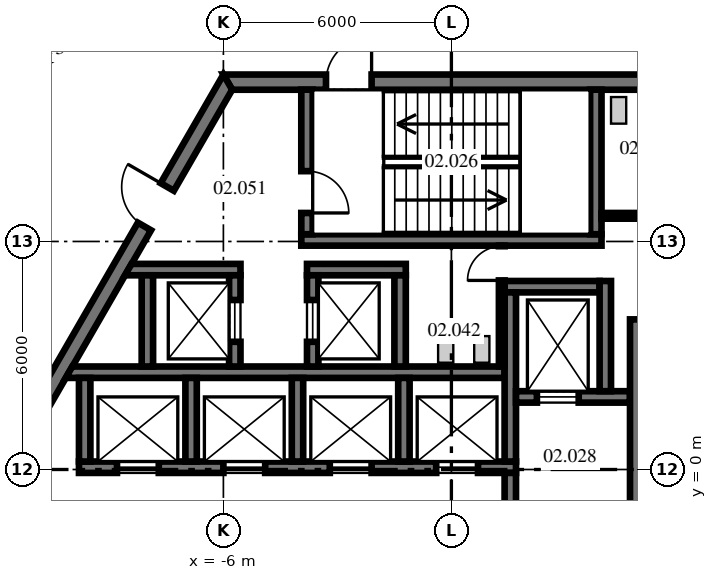
"""IFC4 building model, lengths in metres.
Left out: names, types, materials, properties, quantities, classifications, styles, units other than length and angle.
Written with IfcOpenShell. Run it as: python <this file> out.ifc"""

import sys

from ifc_helpers import new_model, si_unit, direction, frame, frame_2d, origin, place, context, subcontext, project, spatial, polyline, rectangle, outline, extrude, source, transform, mapped, element, fill, save


model = new_model("IFC4")
c1 = context("Model", 3, precision=1e-05, world=origin(), true_north=direction((0.0, 1.0)))
c2 = subcontext(c1, "Body", "Model", "MODEL_VIEW")
j1 = project(units=[si_unit("LENGTHUNIT", "METRE"), si_unit("PLANEANGLEUNIT", "RADIAN")], contexts=[c1])
p1 = place(None, origin())
s1 = spatial("IfcSite", under=j1, at=p1, CompositionType="ELEMENT")
p2 = place(p1, origin())
s2 = spatial("IfcBuilding", under=s1, at=p2, CompositionType="ELEMENT")
p3 = place(p2, frame((0.0, 0.0, 11.5)))
s3 = spatial("IfcBuildingStorey", under=s2, at=p3, CompositionType="ELEMENT", Elevation=11.5)
m1 = source(origin(), c2, "Body", "SweptSolid", [
    extrude(outline(polyline([(-0.115, -0.2), (11.885, -0.2), (11.654, 0.2), (0.115, 0.2), (-0.115, -0.2)])), origin(), (0.0, 0.0, 1.0), 4.3),
])
p4 = place(p3, frame((5.885, 10.192, 0.0), z_axis=(0.0, 0.0, 1.0), x_axis=(-1.0, 0.0, 0.0)))
e1 = element("IfcWall", 1, at=p4, inside=s3, PredefinedType="SHEAR", context=c2, shape_type="MappedRepresentation", body=[
    mapped(m1, transform((0.0, 0.0, 0.0), scale=1.0)),
])
p5 = place(p4, frame((7.985, 0.0, 0.0)))
e2 = element("IfcOpeningElement", 2, at=p5, cuts=e1, PredefinedType="OPENING", context=c2, shape_type="SweptSolid", body=[
    extrude(rectangle(XDim=1.2, YDim=2.1, at=frame_2d((0.6, 1.05))), frame((0.0, 0.21, 0.0), z_axis=(0.0, -1.0, 0.0), x_axis=(1.0, 0.0, 0.0)), (0.0, 0.0, 1.0), 0.42),
])
p6 = place(p3, frame((-5.885, 10.192, 0.0), z_axis=(0.0, 0.0, 1.0), x_axis=(-0.499996592174, -0.866027371285, 0.0)))
e3 = element("IfcWall", 3, at=p6, inside=s3, PredefinedType="SHEAR", context=c2, shape_type="MappedRepresentation", body=[
    mapped(m1, transform((0.0, 0.0, 0.0), scale=1.0)),
])
p7 = place(p6, frame((3.185, 0.0, 0.0)))
e4 = element("IfcOpeningElement", 4, at=p7, cuts=e3, PredefinedType="OPENING", context=c2, shape_type="SweptSolid", body=[
    extrude(rectangle(XDim=1.2, YDim=2.1, at=frame_2d((0.6, 1.05))), frame((0.0, 0.21, 0.0), z_axis=(0.0, -1.0, 0.0), x_axis=(1.0, 0.0, 0.0)), (0.0, 0.0, 1.0), 0.42),
])
p8 = place(p3, frame((-11.769, 0.0, 0.0), z_axis=(0.0, 0.0, 1.0), x_axis=(0.499996592174, -0.866027371285, 0.0)))
e5 = element("IfcWall", 5, at=p8, inside=s3, PredefinedType="SHEAR", context=c2, shape_type="MappedRepresentation", body=[
    mapped(m1, transform((0.0, 0.0, 0.0), scale=1.0)),
])
p9 = place(p8, frame((1.405, 0.0, 0.0)))
e6 = element("IfcOpeningElement", 6, at=p9, cuts=e5, PredefinedType="OPENING", context=c2, shape_type="SweptSolid", body=[
    extrude(rectangle(XDim=1.8, YDim=2.1, at=frame_2d((0.9, 1.05))), frame((0.0, 0.21, 0.0), z_axis=(0.0, -1.0, 0.0), x_axis=(1.0, 0.0, 0.0)), (0.0, 0.0, 1.0), 0.42),
])
p10 = place(p8, frame((7.915, 0.0, 0.0)))
e7 = element("IfcOpeningElement", 7, at=p10, cuts=e5, PredefinedType="OPENING", context=c2, shape_type="SweptSolid", body=[
    extrude(rectangle(XDim=1.2, YDim=2.1, at=frame_2d((0.6, 1.05))), frame((0.0, 0.21, 0.0), z_axis=(0.0, -1.0, 0.0), x_axis=(1.0, 0.0, 0.0)), (0.0, 0.0, 1.0), 0.42),
])
m2 = source(origin(), c2, "Body", "SweptSolid", [
    extrude(rectangle(XDim=11.5, YDim=0.3, at=frame_2d((5.75, 0.0))), origin(), (0.0, 0.0, 1.0), 4.3),
])
p11 = place(p3, frame((-9.8, 0.06, 0.0), z_axis=(0.0, 0.0, 1.0), x_axis=(1.0, 0.0, 0.0)))
e8 = element("IfcWall", 8, at=p11, inside=s3, PredefinedType="SHEAR", context=c2, shape_type="MappedRepresentation", body=[
    mapped(m2, transform((0.0, 0.0, 0.0), scale=1.0)),
])
p12 = place(p11, frame((1.0, 0.0, 0.0)))
e9 = element("IfcOpeningElement", 9, at=p12, cuts=e8, PredefinedType="OPENING", context=c2, shape_type="SweptSolid", body=[
    extrude(rectangle(XDim=1.1, YDim=2.1, at=frame_2d((0.55, 1.05))), frame((0.0, 0.16, 0.0), z_axis=(0.0, -1.0, 0.0), x_axis=(1.0, 0.0, 0.0)), (0.0, 0.0, 1.0), 0.32),
])
p13 = place(p11, frame((3.8, 0.0, 0.0)))
e10 = element("IfcOpeningElement", 10, at=p13, cuts=e8, PredefinedType="OPENING", context=c2, shape_type="SweptSolid", body=[
    extrude(rectangle(XDim=1.1, YDim=2.1, at=frame_2d((0.55, 1.05))), frame((0.0, 0.16, 0.0), z_axis=(0.0, -1.0, 0.0), x_axis=(1.0, 0.0, 0.0)), (0.0, 0.0, 1.0), 0.32),
])
p14 = place(p11, frame((6.6, 0.0, 0.0)))
e11 = element("IfcOpeningElement", 11, at=p14, cuts=e8, PredefinedType="OPENING", context=c2, shape_type="SweptSolid", body=[
    extrude(rectangle(XDim=1.1, YDim=2.1, at=frame_2d((0.55, 1.05))), frame((0.0, 0.16, 0.0), z_axis=(0.0, -1.0, 0.0), x_axis=(1.0, 0.0, 0.0)), (0.0, 0.0, 1.0), 0.32),
])
p15 = place(p11, frame((9.4, 0.0, 0.0)))
e12 = element("IfcOpeningElement", 12, at=p15, cuts=e8, PredefinedType="OPENING", context=c2, shape_type="SweptSolid", body=[
    extrude(rectangle(XDim=1.1, YDim=2.1, at=frame_2d((0.55, 1.05))), frame((0.0, 0.16, 0.0), z_axis=(0.0, -1.0, 0.0), x_axis=(1.0, 0.0, 0.0)), (0.0, 0.0, 1.0), 0.32),
])
m3 = source(origin(), c2, "Body", "SweptSolid", [
    extrude(outline(polyline([(11.2, -0.15), (-0.349, -0.15), (-0.176, 0.15), (11.2, 0.15), (11.2, -0.15)])), origin(), (0.0, 0.0, 1.0), 4.3),
])
p16 = place(p3, frame((-9.8, 2.56, 0.0), z_axis=(0.0, 0.0, 1.0), x_axis=(1.0, 0.0, 0.0)))
e13 = element("IfcWall", 13, at=p16, inside=s3, PredefinedType="SHEAR", context=c2, shape_type="MappedRepresentation", body=[
    mapped(m3, transform((0.0, 0.0, 0.0), scale=1.0)),
])
m4 = source(origin(), c2, "Body", "SweptSolid", [
    extrude(rectangle(XDim=2.5, YDim=0.3, at=frame_2d((1.25, 0.0))), origin(), (0.0, 0.0, 1.0), 4.3),
])
p17 = place(p3, frame((1.4, 4.81, 0.0), z_axis=(0.0, 0.0, 1.0), x_axis=(1.0, 0.0, 0.0)))
e14 = element("IfcWall", 14, at=p17, inside=s3, PredefinedType="SHEAR", context=c2, shape_type="MappedRepresentation", body=[
    mapped(m4, transform((0.0, 0.0, 0.0), scale=1.0)),
])
m5 = source(origin(), c2, "Body", "SweptSolid", [
    extrude(rectangle(XDim=4.45, YDim=0.3, at=frame_2d((2.225, 0.0))), origin(), (0.0, 0.0, 1.0), 4.3),
])
p18 = place(p3, frame((1.55, 0.21, 0.0), z_axis=(0.0, 0.0, 1.0), x_axis=(0.0, 1.0, 0.0)))
e15 = element("IfcWall", 15, at=p18, inside=s3, PredefinedType="SHEAR", context=c2, shape_type="MappedRepresentation", body=[
    mapped(m5, transform((0.0, 0.0, 0.0), scale=1.0)),
])
m6 = source(origin(), c2, "Body", "SweptSolid", [
    extrude(rectangle(XDim=3.0, YDim=0.3, at=frame_2d((1.5, 0.0))), origin(), (0.0, 0.0, 1.0), 4.3),
])
p19 = place(p3, frame((1.7, 1.91, 0.0), z_axis=(0.0, 0.0, 1.0), x_axis=(1.0, 0.0, 0.0)))
e16 = element("IfcWall", 16, at=p19, inside=s3, PredefinedType="SHEAR", context=c2, shape_type="MappedRepresentation", body=[
    mapped(m6, transform((0.0, 0.0, 0.0), scale=1.0)),
])
p20 = place(p19, frame((0.55, 0.0, 0.0)))
e17 = element("IfcOpeningElement", 17, at=p20, cuts=e16, PredefinedType="OPENING", context=c2, shape_type="SweptSolid", body=[
    extrude(rectangle(XDim=1.1, YDim=2.1, at=frame_2d((0.55, 1.05))), frame((0.0, 0.16, 0.0), z_axis=(0.0, -1.0, 0.0), x_axis=(1.0, 0.0, 0.0)), (0.0, 0.0, 1.0), 0.32),
])
m7 = source(origin(), c2, "Body", "SweptSolid", [
    extrude(rectangle(XDim=2.9, YDim=0.3, at=frame_2d((1.45, 0.0))), origin(), (0.0, 0.0, 1.0), 4.3),
])
p21 = place(p3, frame((4.05, 2.06, 0.0), z_axis=(0.0, 0.0, 1.0), x_axis=(0.0, 1.0, 0.0)))
e18 = element("IfcWall", 18, at=p21, inside=s3, PredefinedType="SHEAR", context=c2, shape_type="MappedRepresentation", body=[
    mapped(m7, transform((0.0, 0.0, 0.0), scale=1.0)),
])
m8 = source(origin(), c2, "Body", "SweptSolid", [
    extrude(rectangle(XDim=2.2, YDim=0.3, at=frame_2d((1.1, 0.0))), origin(), (0.0, 0.0, 1.0), 4.3),
])
p22 = place(p3, frame((-9.65, 0.21, 0.0), z_axis=(0.0, 0.0, 1.0), x_axis=(0.0, 1.0, 0.0)))
e19 = element("IfcWall", 19, at=p22, inside=s3, PredefinedType="SHEAR", context=c2, shape_type="MappedRepresentation", body=[
    mapped(m8, transform((0.0, 0.0, 0.0), scale=1.0)),
])
p23 = place(p3, frame((1.55, -3.09, 0.0), z_axis=(0.0, 0.0, 1.0), x_axis=(0.0, 1.0, 0.0)))
e20 = element("IfcWall", 20, at=p23, inside=s3, PredefinedType="SHEAR", context=c2, shape_type="MappedRepresentation", body=[
    mapped(m6, transform((0.0, 0.0, 0.0), scale=1.0)),
])
p24 = place(p23, frame((0.9, 0.0, 0.0)))
e21 = element("IfcOpeningElement", 21, at=p24, cuts=e20, PredefinedType="OPENING", context=c2, shape_type="SweptSolid", body=[
    extrude(rectangle(XDim=1.2, YDim=2.1, at=frame_2d((0.6, 1.05))), frame((0.0, 0.16, 0.0), z_axis=(0.0, -1.0, 0.0), x_axis=(1.0, 0.0, 0.0)), (0.0, 0.0, 1.0), 0.32),
])
m9 = source(origin(), c2, "Body", "SweptSolid", [
    extrude(outline(polyline([(-0.15, -0.15), (9.99, -0.15), (9.99, 0.15), (0.15, 0.15), (-0.15, -0.15)])), origin(), (0.0, 0.0, 1.0), 4.3),
])
p25 = place(p3, frame((4.85, -6.04, 0.0), z_axis=(0.0, 0.0, 1.0), x_axis=(0.0, 1.0, 0.0)))
e22 = element("IfcWall", 22, at=p25, inside=s3, PredefinedType="SHEAR", context=c2, shape_type="MappedRepresentation", body=[
    mapped(m9, transform((0.0, 0.0, 0.0), scale=1.0)),
])
p26 = place(p25, frame((3.19, 0.0, 0.0)))
e23 = element("IfcOpeningElement", 23, at=p26, cuts=e22, PredefinedType="OPENING", context=c2, shape_type="SweptSolid", body=[
    extrude(rectangle(XDim=1.1, YDim=2.1, at=frame_2d((0.55, 1.05))), frame((0.0, 0.16, 0.0), z_axis=(0.0, -1.0, 0.0), x_axis=(1.0, 0.0, 0.0)), (0.0, 0.0, 1.0), 0.32),
])
m10 = source(origin(), c2, "Body", "SweptSolid", [
    extrude(rectangle(XDim=7.9, YDim=0.3, at=frame_2d((3.95, 0.0))), origin(), (0.0, 0.0, 1.0), 4.3),
])
p27 = place(p3, frame((-3.95, 6.04, 0.0), z_axis=(0.0, 0.0, 1.0), x_axis=(1.0, 0.0, 0.0)))
e24 = element("IfcWall", 24, at=p27, inside=s3, PredefinedType="SHEAR", context=c2, shape_type="MappedRepresentation", body=[
    mapped(m10, transform((0.0, 0.0, 0.0), scale=1.0)),
])
m11 = source(origin(), c2, "Body", "SweptSolid", [
    extrude(outline(polyline([(0.0, -0.15), (0.0, 0.15), (3.804, 0.15), (3.804, -0.15), (0.0, -0.15)])), origin(), (0.0, 0.0, 1.0), 4.3),
])
p28 = place(p3, frame((-3.8, 6.19, 0.0), z_axis=(0.0, 0.0, 1.0), x_axis=(0.0, 1.0, 0.0)))
e25 = element("IfcWall", 25, at=p28, inside=s3, PredefinedType="SHEAR", context=c2, shape_type="MappedRepresentation", body=[
    mapped(m11, transform((0.0, 0.0, 0.0), scale=1.0)),
])
p29 = place(p28, frame((0.56, 0.0, 0.0)))
e26 = element("IfcOpeningElement", 26, at=p29, cuts=e25, PredefinedType="OPENING", context=c2, shape_type="SweptSolid", body=[
    extrude(rectangle(XDim=1.1, YDim=2.1, at=frame_2d((0.55, 1.05))), frame((0.0, 0.16, 0.0), z_axis=(0.0, -1.0, 0.0), x_axis=(1.0, 0.0, 0.0)), (0.0, 0.0, 1.0), 0.32),
])
p30 = place(p3, frame((3.8, 6.19, 0.0), z_axis=(0.0, 0.0, 1.0), x_axis=(0.0, 1.0, 0.0)))
e27 = element("IfcWall", 27, at=p30, inside=s3, PredefinedType="SHEAR", context=c2, shape_type="MappedRepresentation", body=[
    mapped(m11, transform((0.0, 0.0, 0.0), scale=1.0)),
])
m12 = source(origin(), c2, "Body", "SweptSolid", [
    extrude(outline(polyline([(2.6, -0.15), (-0.44, -0.15), (-0.267, 0.15), (2.6, 0.15), (2.6, -0.15)])), origin(), (0.0, 0.0, 1.0), 4.3),
])
p31 = place(p3, frame((-8.15, 5.26, 0.0), z_axis=(0.0, 0.0, 1.0), x_axis=(1.0, 0.0, 0.0)))
e28 = element("IfcWall", 28, at=p31, inside=s3, PredefinedType="SHEAR", context=c2, shape_type="MappedRepresentation", body=[
    mapped(m12, transform((0.0, 0.0, 0.0), scale=1.0)),
])
m13 = source(origin(), c2, "Body", "SweptSolid", [
    extrude(rectangle(XDim=2.4, YDim=0.3, at=frame_2d((1.2, 0.0))), origin(), (0.0, 0.0, 1.0), 4.3),
])
p32 = place(p3, frame((-8.0, 2.71, 0.0), z_axis=(0.0, 0.0, 1.0), x_axis=(0.0, 1.0, 0.0)))
e29 = element("IfcWall", 29, at=p32, inside=s3, PredefinedType="SHEAR", context=c2, shape_type="MappedRepresentation", body=[
    mapped(m13, transform((0.0, 0.0, 0.0), scale=1.0)),
])
p33 = place(p3, frame((-5.7, 2.71, 0.0), z_axis=(0.0, 0.0, 1.0), x_axis=(0.0, 1.0, 0.0)))
e30 = element("IfcWall", 30, at=p33, inside=s3, PredefinedType="SHEAR", context=c2, shape_type="MappedRepresentation", body=[
    mapped(m13, transform((0.0, 0.0, 0.0), scale=1.0)),
])
p34 = place(p33, frame((0.65, 0.0, 0.0)))
e31 = element("IfcOpeningElement", 31, at=p34, cuts=e30, PredefinedType="OPENING", context=c2, shape_type="SweptSolid", body=[
    extrude(rectangle(XDim=1.1, YDim=2.1, at=frame_2d((0.55, 1.05))), frame((0.0, 0.16, 0.0), z_axis=(0.0, -1.0, 0.0), x_axis=(1.0, 0.0, 0.0)), (0.0, 0.0, 1.0), 0.32),
])
m14 = source(origin(), c2, "Body", "SweptSolid", [
    extrude(rectangle(XDim=2.6, YDim=0.3, at=frame_2d((1.3, 0.0))), origin(), (0.0, 0.0, 1.0), 4.3),
])
p35 = place(p3, frame((-3.8, 5.26, 0.0), z_axis=(0.0, 0.0, 1.0), x_axis=(1.0, 0.0, 0.0)))
e32 = element("IfcWall", 32, at=p35, inside=s3, PredefinedType="SHEAR", context=c2, shape_type="MappedRepresentation", body=[
    mapped(m14, transform((0.0, 0.0, 0.0), scale=1.0)),
])
p36 = place(p3, frame((-3.65, 2.71, 0.0), z_axis=(0.0, 0.0, 1.0), x_axis=(0.0, 1.0, 0.0)))
e33 = element("IfcWall", 33, at=p36, inside=s3, PredefinedType="SHEAR", context=c2, shape_type="MappedRepresentation", body=[
    mapped(m13, transform((0.0, 0.0, 0.0), scale=1.0)),
])
p37 = place(p36, frame((0.65, 0.0, 0.0)))
e34 = element("IfcOpeningElement", 34, at=p37, cuts=e33, PredefinedType="OPENING", context=c2, shape_type="SweptSolid", body=[
    extrude(rectangle(XDim=1.1, YDim=2.1, at=frame_2d((0.55, 1.05))), frame((0.0, 0.16, 0.0), z_axis=(0.0, -1.0, 0.0), x_axis=(1.0, 0.0, 0.0)), (0.0, 0.0, 1.0), 0.32),
])
p38 = place(p3, frame((-1.35, 2.71, 0.0), z_axis=(0.0, 0.0, 1.0), x_axis=(0.0, 1.0, 0.0)))
e35 = element("IfcWall", 35, at=p38, inside=s3, PredefinedType="SHEAR", context=c2, shape_type="MappedRepresentation", body=[
    mapped(m13, transform((0.0, 0.0, 0.0), scale=1.0)),
])
m15 = source(origin(), c2, "Body", "SweptSolid", [
    extrude(rectangle(XDim=3.18, YDim=0.15, at=frame_2d((1.59, 0.0))), origin(), (0.0, 0.0, 1.0), 4.3),
])
p39 = place(p3, frame((1.325, 2.71, 0.0), z_axis=(0.0, 0.0, 1.0), x_axis=(0.0, 1.0, 0.0)))
e36 = element("IfcWall", 36, at=p39, inside=s3, PredefinedType="PARTITIONING", context=c2, shape_type="MappedRepresentation", body=[
    mapped(m15, transform((0.0, 0.0, 0.0), scale=1.0)),
])
p40 = place(p39, frame((2.265, 0.0, 0.0)))
e37 = element("IfcOpeningElement", 37, at=p40, cuts=e36, PredefinedType="OPENING", context=c2, shape_type="SweptSolid", body=[
    extrude(rectangle(XDim=0.9, YDim=2.1, at=frame_2d((0.45, 1.05))), frame((0.0, 0.085, 0.0), z_axis=(0.0, -1.0, 0.0), x_axis=(1.0, 0.0, 0.0)), (0.0, 0.0, 1.0), 0.17),
])
m16 = source(origin(), c2, "Body", "SweptSolid", [
    extrude(outline(polyline([(0.0, -0.075), (0.0, 0.075), (3.693, 0.075), (3.78, -0.075), (0.0, -0.075)])), origin(), (0.0, 0.0, 1.0), 4.3),
])
p41 = place(p3, frame((3.95, 6.675, 0.0), z_axis=(0.0, 0.0, 1.0), x_axis=(1.0, 0.0, 0.0)))
e38 = element("IfcWall", 38, at=p41, inside=s3, PredefinedType="PARTITIONING", context=c2, shape_type="MappedRepresentation", body=[
    mapped(m16, transform((0.0, 0.0, 0.0), scale=1.0)),
])
p42 = place(p41, frame((1.6, 0.0, 0.0)))
e39 = element("IfcOpeningElement", 39, at=p42, cuts=e38, PredefinedType="OPENING", context=c2, shape_type="SweptSolid", body=[
    extrude(rectangle(XDim=0.9, YDim=2.1, at=frame_2d((0.45, 1.05))), frame((0.0, 0.085, 0.0), z_axis=(0.0, -1.0, 0.0), x_axis=(1.0, 0.0, 0.0)), (0.0, 0.0, 1.0), 0.17),
])
for number, where, z_axis, x_axis in (
    (40, (-6.85, 0.21, 0.0), (0.0, 0.0, 1.0), (0.0, 1.0, 0.0)),
    (41, (-4.05, 0.21, 0.0), (0.0, 0.0, 1.0), (0.0, 1.0, 0.0)),
    (42, (-1.25, 0.21, 0.0), (0.0, 0.0, 1.0), (0.0, 1.0, 0.0)),
):
    element("IfcWall", number, at=place(p3, frame(where, z_axis=z_axis, x_axis=x_axis)), inside=s3, PredefinedType="SHEAR", context=c2, shape_type="MappedRepresentation", body=[
        mapped(m8, transform((0.0, 0.0, 0.0), scale=1.0)),
    ])
p43 = place(p3, frame((-18.441, -0.043, 0.0), z_axis=(0.0, 0.0, 1.0), x_axis=(0.499994421829, -0.866028624319, 0.0)))
e43 = element("IfcWall", 43, at=p43, inside=s3, PredefinedType="PARTITIONING", context=c2, shape_type="SweptSolid", body=[
    extrude(rectangle(XDim=18.416, YDim=0.15, at=frame_2d((9.208, 0.0))), origin(), (0.0, 0.0, 1.0), 4.3),
])
p44 = place(p43, frame((3.602, 0.0, 0.0)))
e44 = element("IfcOpeningElement", 44, at=p44, cuts=e43, PredefinedType="OPENING", context=c2, shape_type="SweptSolid", body=[
    extrude(rectangle(XDim=1.8, YDim=2.4, at=frame_2d((0.9, 1.2))), frame((0.0, 0.085, 0.0), z_axis=(0.0, -1.0, 0.0), x_axis=(1.0, 0.0, 0.0)), (0.0, 0.0, 1.0), 0.17),
])
p45 = place(p43, frame((1.0, 0.0, 0.0)))
e45 = element("IfcOpeningElement", 45, at=p45, cuts=e43, PredefinedType="OPENING", context=c2, shape_type="SweptSolid", body=[
    extrude(rectangle(XDim=0.9, YDim=2.1, at=frame_2d((0.45, 1.05))), frame((0.0, 0.085, 0.0), z_axis=(0.0, -1.0, 0.0), x_axis=(1.0, 0.0, 0.0)), (0.0, 0.0, 1.0), 0.17),
])
p46 = place(p43, frame((7.031, 0.0, 0.0)))
e46 = element("IfcOpeningElement", 46, at=p46, cuts=e43, PredefinedType="OPENING", context=c2, shape_type="SweptSolid", body=[
    extrude(rectangle(XDim=0.9, YDim=2.1, at=frame_2d((0.45, 1.05))), frame((0.0, 0.085, 0.0), z_axis=(0.0, -1.0, 0.0), x_axis=(1.0, 0.0, 0.0)), (0.0, 0.0, 1.0), 0.17),
])
p47 = place(p43, frame((13.233, 0.0, 0.0)))
e47 = element("IfcOpeningElement", 47, at=p47, cuts=e43, PredefinedType="OPENING", context=c2, shape_type="SweptSolid", body=[
    extrude(rectangle(XDim=0.9, YDim=2.1, at=frame_2d((0.45, 1.05))), frame((0.0, 0.085, 0.0), z_axis=(0.0, -1.0, 0.0), x_axis=(1.0, 0.0, 0.0)), (0.0, 0.0, 1.0), 0.17),
])
p48 = place(p3, frame((-18.466, -0.0, 0.0), z_axis=(0.0, 0.0, 1.0), x_axis=(0.499989475653, 0.866031479934, 0.0)))
e48 = element("IfcWall", 48, at=p48, inside=s3, PredefinedType="PARTITIONING", context=c2, shape_type="SweptSolid", body=[
    extrude(rectangle(XDim=18.467, YDim=0.15, at=frame_2d((9.234, 0.0))), origin(), (0.0, 0.0, 1.0), 4.3),
])
p49 = place(p48, frame((12.391, 0.0, 0.0)))
e49 = element("IfcOpeningElement", 49, at=p49, cuts=e48, PredefinedType="OPENING", context=c2, shape_type="SweptSolid", body=[
    extrude(rectangle(XDim=1.8, YDim=2.4, at=frame_2d((0.9, 1.2))), frame((0.0, 0.085, 0.0), z_axis=(0.0, -1.0, 0.0), x_axis=(1.0, 0.0, 0.0)), (0.0, 0.0, 1.0), 0.17),
])
p50 = place(p48, frame((4.083, 0.0, 0.0)))
e50 = element("IfcOpeningElement", 50, at=p50, cuts=e48, PredefinedType="OPENING", context=c2, shape_type="SweptSolid", body=[
    extrude(rectangle(XDim=0.9, YDim=2.1, at=frame_2d((0.45, 1.05))), frame((0.0, 0.085, 0.0), z_axis=(0.0, -1.0, 0.0), x_axis=(1.0, 0.0, 0.0)), (0.0, 0.0, 1.0), 0.17),
])
p51 = place(p5, frame((1.2, 0.0, 0.0), z_axis=(0.0, 0.0, 1.0), x_axis=(-1.0, 0.0, 0.0)))
e51 = element("IfcDoor", 51, at=p51, inside=s3, OperationType="SINGLE_SWING_RIGHT", PredefinedType="DOOR", context=c2, shape_type="SweptSolid", body=[
    extrude(rectangle(XDim=1.2, YDim=2.1, at=frame_2d((0.6, 1.05))), frame((0.0, 0.025, 0.0), z_axis=(0.0, -1.0, 0.0), x_axis=(1.0, 0.0, 0.0)), (0.0, 0.0, 1.0), 0.05),
])
fill(e2, e51)
p52 = place(p7, frame((1.2, 0.0, 0.0), z_axis=(0.0, 0.0, 1.0), x_axis=(-1.0, 0.0, 0.0)))
e52 = element("IfcDoor", 52, at=p52, inside=s3, OperationType="SINGLE_SWING_RIGHT", PredefinedType="DOOR", context=c2, shape_type="SweptSolid", body=[
    extrude(rectangle(XDim=1.2, YDim=2.1, at=frame_2d((0.6, 1.05))), frame((0.0, 0.025, 0.0), z_axis=(0.0, -1.0, 0.0), x_axis=(1.0, 0.0, 0.0)), (0.0, 0.0, 1.0), 0.05),
])
fill(e4, e52)
p53 = place(p29, frame((1.1, 0.0, 0.0), z_axis=(0.0, 0.0, 1.0), x_axis=(-1.0, 0.0, 0.0)))
e53 = element("IfcDoor", 53, at=p53, inside=s3, OperationType="SINGLE_SWING_RIGHT", PredefinedType="DOOR", context=c2, shape_type="SweptSolid", body=[
    extrude(rectangle(XDim=1.1, YDim=2.1, at=frame_2d((0.55, 1.05))), frame((0.0, 0.025, 0.0), z_axis=(0.0, -1.0, 0.0), x_axis=(1.0, 0.0, 0.0)), (0.0, 0.0, 1.0), 0.05),
])
fill(e26, e53)
p54 = place(p40, origin())
e54 = element("IfcDoor", 54, at=p54, inside=s3, OperationType="SINGLE_SWING_LEFT", PredefinedType="DOOR", context=c2, shape_type="SweptSolid", body=[
    extrude(rectangle(XDim=0.9, YDim=2.1, at=frame_2d((0.45, 1.05))), frame((0.0, 0.025, 0.0), z_axis=(0.0, -1.0, 0.0), x_axis=(1.0, 0.0, 0.0)), (0.0, 0.0, 1.0), 0.05),
])
fill(e37, e54)
p55 = place(p12, origin())
e55 = element("IfcDoor", 55, at=p55, inside=s3, OperationType="DOUBLE_DOOR_SLIDING", PredefinedType="DOOR", context=c2, shape_type="SweptSolid", body=[
    extrude(rectangle(XDim=1.1, YDim=2.1, at=frame_2d((0.55, 1.05))), frame((0.0, 0.025, 0.0), z_axis=(0.0, -1.0, 0.0), x_axis=(1.0, 0.0, 0.0)), (0.0, 0.0, 1.0), 0.05),
])
fill(e9, e55)
p56 = place(p13, origin())
e56 = element("IfcDoor", 56, at=p56, inside=s3, OperationType="DOUBLE_DOOR_SLIDING", PredefinedType="DOOR", context=c2, shape_type="SweptSolid", body=[
    extrude(rectangle(XDim=1.1, YDim=2.1, at=frame_2d((0.55, 1.05))), frame((0.0, 0.025, 0.0), z_axis=(0.0, -1.0, 0.0), x_axis=(1.0, 0.0, 0.0)), (0.0, 0.0, 1.0), 0.05),
])
fill(e10, e56)
p57 = place(p14, origin())
e57 = element("IfcDoor", 57, at=p57, inside=s3, OperationType="DOUBLE_DOOR_SLIDING", PredefinedType="DOOR", context=c2, shape_type="SweptSolid", body=[
    extrude(rectangle(XDim=1.1, YDim=2.1, at=frame_2d((0.55, 1.05))), frame((0.0, 0.025, 0.0), z_axis=(0.0, -1.0, 0.0), x_axis=(1.0, 0.0, 0.0)), (0.0, 0.0, 1.0), 0.05),
])
fill(e11, e57)
p58 = place(p15, origin())
e58 = element("IfcDoor", 58, at=p58, inside=s3, OperationType="DOUBLE_DOOR_SLIDING", PredefinedType="DOOR", context=c2, shape_type="SweptSolid", body=[
    extrude(rectangle(XDim=1.1, YDim=2.1, at=frame_2d((0.55, 1.05))), frame((0.0, 0.025, 0.0), z_axis=(0.0, -1.0, 0.0), x_axis=(1.0, 0.0, 0.0)), (0.0, 0.0, 1.0), 0.05),
])
fill(e12, e58)
p59 = place(p20, origin())
e59 = element("IfcDoor", 59, at=p59, inside=s3, OperationType="DOUBLE_DOOR_SLIDING", PredefinedType="DOOR", context=c2, shape_type="SweptSolid", body=[
    extrude(rectangle(XDim=1.1, YDim=2.1, at=frame_2d((0.55, 1.05))), frame((0.0, 0.025, 0.0), z_axis=(0.0, -1.0, 0.0), x_axis=(1.0, 0.0, 0.0)), (0.0, 0.0, 1.0), 0.05),
])
fill(e17, e59)
p60 = place(p34, origin())
e60 = element("IfcDoor", 60, at=p60, inside=s3, OperationType="DOUBLE_DOOR_SLIDING", PredefinedType="DOOR", context=c2, shape_type="SweptSolid", body=[
    extrude(rectangle(XDim=1.1, YDim=2.1, at=frame_2d((0.55, 1.05))), frame((0.0, 0.025, 0.0), z_axis=(0.0, -1.0, 0.0), x_axis=(1.0, 0.0, 0.0)), (0.0, 0.0, 1.0), 0.05),
])
fill(e31, e60)
p61 = place(p37, origin())
e61 = element("IfcDoor", 61, at=p61, inside=s3, OperationType="DOUBLE_DOOR_SLIDING", PredefinedType="DOOR", context=c2, shape_type="SweptSolid", body=[
    extrude(rectangle(XDim=1.1, YDim=2.1, at=frame_2d((0.55, 1.05))), frame((0.0, 0.025, 0.0), z_axis=(0.0, -1.0, 0.0), x_axis=(1.0, 0.0, 0.0)), (0.0, 0.0, 1.0), 0.05),
])
fill(e34, e61)
save(model, sys.argv[1])
